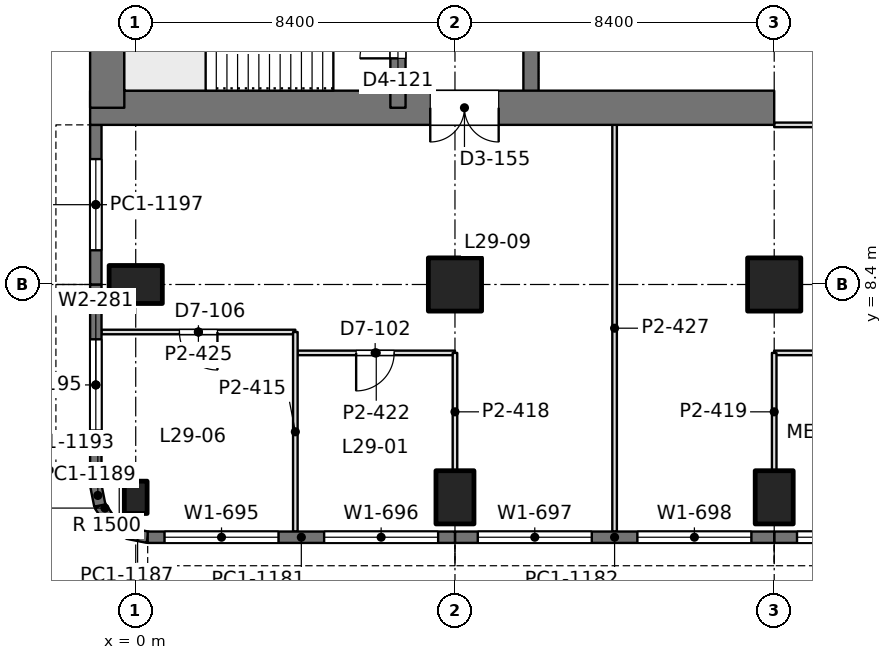
"""IFC4 building model, lengths in metres.
Left out: names, types, materials, properties, quantities, classifications, styles, units other than length and angle.
Written with IfcOpenShell. Run it as: python <this file> out.ifc"""

import sys

from ifc_helpers import new_model, si_unit, direction, frame, frame_2d, origin, origin_2d, place, context, subcontext, project, spatial, rectangle, extrude, element, fill, save


model = new_model("IFC4")
c1 = context("Model", 3, precision=1e-05, world=origin(), true_north=direction((0.0, 1.0)))
c2 = subcontext(c1, "Body", "Model", "MODEL_VIEW")
j1 = project(units=[si_unit("LENGTHUNIT", "METRE"), si_unit("PLANEANGLEUNIT", "RADIAN")], contexts=[c1])
p1 = place(None, origin())
s1 = spatial("IfcSite", under=j1, at=p1, CompositionType="ELEMENT")
p2 = place(p1, origin())
s2 = spatial("IfcBuilding", under=s1, at=p2, CompositionType="ELEMENT")
p3 = place(p2, frame((0.0, 0.0, 130.2)))
s3 = spatial("IfcBuildingStorey", under=s2, at=p3, CompositionType="ELEMENT", Elevation=130.2)
p4 = place(p3, frame((0.0, 2.8, 0.0), z_axis=(0.0, 0.0, 1.0), x_axis=(1.0, 0.0, 0.0)))
e1 = element("IfcColumn", 1, at=p4, inside=s3, PredefinedType="COLUMN", context=c2, shape_type="SweptSolid", body=[
    extrude(rectangle(XDim=0.6, YDim=0.85, at=origin_2d()), origin(), (0.0, 0.0, 1.0), 4.2),
])
for number, where, z_axis, x_axis in (
    (2, (0.0, 8.4, 0.0), (0.0, 0.0, 1.0), (0.0, 1.0, 0.0)),
    (3, (8.4, 2.8, 0.0), (0.0, 0.0, 1.0), (1.0, 0.0, 0.0)),
):
    element("IfcColumn", number, at=place(p3, frame(where, z_axis=z_axis, x_axis=x_axis)), inside=s3, PredefinedType="COLUMN", context=c2, shape_type="SweptSolid", body=[
        extrude(rectangle(XDim=1.0, YDim=1.4, at=origin_2d()), origin(), (0.0, 0.0, 1.0), 4.2),
    ])
p5 = place(p3, frame((8.4, 8.4, 0.0), z_axis=(0.0, 0.0, 1.0), x_axis=(1.0, 0.0, 0.0)))
e4 = element("IfcColumn", 4, at=p5, inside=s3, PredefinedType="COLUMN", context=c2, shape_type="SweptSolid", body=[
    extrude(rectangle(XDim=1.4, YDim=1.4, at=origin_2d()), origin(), (0.0, 0.0, 1.0), 4.2),
])
p6 = place(p3, frame((16.8, 2.8, 0.0), z_axis=(0.0, 0.0, 1.0), x_axis=(1.0, 0.0, 0.0)))
e5 = element("IfcColumn", 5, at=p6, inside=s3, PredefinedType="COLUMN", context=c2, shape_type="SweptSolid", body=[
    extrude(rectangle(XDim=1.0, YDim=1.4, at=origin_2d()), origin(), (0.0, 0.0, 1.0), 4.2),
])
p7 = place(p3, frame((16.8, 8.4, 0.0), z_axis=(0.0, 0.0, 1.0), x_axis=(1.0, 0.0, 0.0)))
e6 = element("IfcColumn", 6, at=p7, inside=s3, PredefinedType="COLUMN", context=c2, shape_type="SweptSolid", body=[
    extrude(rectangle(XDim=1.4, YDim=1.4, at=origin_2d()), origin(), (0.0, 0.0, 1.0), 4.2),
])
p8 = place(p3, frame((-1.2, 13.05, 0.0), z_axis=(0.0, 0.0, 1.0), x_axis=(1.0, 0.0, 0.0)))
e7 = element("IfcWall", 7, at=p8, inside=s3, PredefinedType="SHEAR", context=c2, shape_type="SweptSolid", body=[
    extrude(rectangle(XDim=18.0, YDim=0.9, at=frame_2d((9.0, 0.0))), origin(), (0.0, 0.0, 1.0), 4.2),
])
p9 = place(p8, frame((8.95, 0.0, 0.0)))
e8 = element("IfcOpeningElement", 8, at=p9, cuts=e7, PredefinedType="OPENING", context=c2, shape_type="SweptSolid", body=[
    extrude(rectangle(XDim=1.8, YDim=2.4, at=frame_2d((0.9, 1.2))), frame((0.0, 0.46, 0.0), z_axis=(0.0, -1.0, 0.0), x_axis=(1.0, 0.0, 0.0)), (0.0, 0.0, 1.0), 0.92),
])
p10 = place(p3, frame((-0.75, 13.05, 0.0), z_axis=(0.0, 0.0, 1.0), x_axis=(0.0, 1.0, 0.0)))
e9 = element("IfcWall", 9, at=p10, inside=s3, PredefinedType="SHEAR", context=c2, shape_type="SweptSolid", body=[
    extrude(rectangle(XDim=24.3, YDim=0.9, at=frame_2d((12.15, 0.0))), origin(), (0.0, 0.0, 1.0), 4.2),
])
p11 = place(p3, frame((6.9, 13.05, 0.0), z_axis=(0.0, 0.0, 1.0), x_axis=(0.0, 1.0, 0.0)))
e10 = element("IfcWall", 10, at=p11, inside=s3, PredefinedType="SHEAR", context=c2, shape_type="SweptSolid", body=[
    extrude(rectangle(XDim=24.3, YDim=0.4, at=frame_2d((12.15, 0.0))), origin(), (0.0, 0.0, 1.0), 4.2),
])
p12 = place(p11, frame((1.3, 0.0, 0.0)))
e11 = element("IfcOpeningElement", 11, at=p12, cuts=e10, PredefinedType="OPENING", context=c2, shape_type="SweptSolid", body=[
    extrude(rectangle(XDim=1.0, YDim=2.2, at=frame_2d((0.5, 1.1))), frame((0.0, 0.21, 0.0), z_axis=(0.0, -1.0, 0.0), x_axis=(1.0, 0.0, 0.0)), (0.0, 0.0, 1.0), 0.42),
])
p13 = place(p11, frame((22.0, 0.0, 0.0)))
e12 = element("IfcOpeningElement", 12, at=p13, cuts=e10, PredefinedType="OPENING", context=c2, shape_type="SweptSolid", body=[
    extrude(rectangle(XDim=1.0, YDim=2.2, at=frame_2d((0.5, 1.1))), frame((0.0, 0.21, 0.0), z_axis=(0.0, -1.0, 0.0), x_axis=(1.0, 0.0, 0.0)), (0.0, 0.0, 1.0), 0.42),
])
p14 = place(p11, frame((5.55, 0.0, 0.0)))
e13 = element("IfcOpeningElement", 13, at=p14, cuts=e10, PredefinedType="OPENING", context=c2, shape_type="SweptSolid", body=[
    extrude(rectangle(XDim=1.0, YDim=2.2, at=frame_2d((0.5, 1.1))), frame((0.0, 0.21, 0.0), z_axis=(0.0, -1.0, 0.0), x_axis=(1.0, 0.0, 0.0)), (0.0, 0.0, 1.0), 0.42),
])
p15 = place(p11, frame((9.55, 0.0, 0.0)))
e14 = element("IfcOpeningElement", 14, at=p15, cuts=e10, PredefinedType="OPENING", context=c2, shape_type="SweptSolid", body=[
    extrude(rectangle(XDim=1.0, YDim=2.2, at=frame_2d((0.5, 1.1))), frame((0.0, 0.21, 0.0), z_axis=(0.0, -1.0, 0.0), x_axis=(1.0, 0.0, 0.0)), (0.0, 0.0, 1.0), 0.42),
])
p16 = place(p11, frame((12.8, 0.0, 0.0)))
e15 = element("IfcOpeningElement", 15, at=p16, cuts=e10, PredefinedType="OPENING", context=c2, shape_type="SweptSolid", body=[
    extrude(rectangle(XDim=1.1, YDim=2.2, at=frame_2d((0.55, 1.1))), frame((0.0, 0.21, 0.0), z_axis=(0.0, -1.0, 0.0), x_axis=(1.0, 0.0, 0.0)), (0.0, 0.0, 1.0), 0.42),
])
p17 = place(p11, frame((15.538, 0.0, 0.0)))
e16 = element("IfcOpeningElement", 16, at=p17, cuts=e10, PredefinedType="OPENING", context=c2, shape_type="SweptSolid", body=[
    extrude(rectangle(XDim=1.1, YDim=2.2, at=frame_2d((0.55, 1.1))), frame((0.0, 0.21, 0.0), z_axis=(0.0, -1.0, 0.0), x_axis=(1.0, 0.0, 0.0)), (0.0, 0.0, 1.0), 0.42),
])
p18 = place(p11, frame((18.262, 0.0, 0.0)))
e17 = element("IfcOpeningElement", 17, at=p18, cuts=e10, PredefinedType="OPENING", context=c2, shape_type="SweptSolid", body=[
    extrude(rectangle(XDim=1.1, YDim=2.2, at=frame_2d((0.55, 1.1))), frame((0.0, 0.21, 0.0), z_axis=(0.0, -1.0, 0.0), x_axis=(1.0, 0.0, 0.0)), (0.0, 0.0, 1.0), 0.42),
])
p19 = place(p3, frame((10.4, 13.05, 0.0), z_axis=(0.0, 0.0, 1.0), x_axis=(0.0, 1.0, 0.0)))
e18 = element("IfcWall", 18, at=p19, inside=s3, PredefinedType="SHEAR", context=c2, shape_type="SweptSolid", body=[
    extrude(rectangle(XDim=24.3, YDim=0.4, at=frame_2d((12.15, 0.0))), origin(), (0.0, 0.0, 1.0), 4.2),
])
p20 = place(p19, frame((10.05, 0.0, 0.0)))
e19 = element("IfcOpeningElement", 19, at=p20, cuts=e18, PredefinedType="OPENING", context=c2, shape_type="SweptSolid", body=[
    extrude(rectangle(XDim=1.1, YDim=2.2, at=frame_2d((0.55, 1.1))), frame((0.0, 0.21, 0.0), z_axis=(0.0, -1.0, 0.0), x_axis=(1.0, 0.0, 0.0)), (0.0, 0.0, 1.0), 0.42),
])
p21 = place(p19, frame((12.9, 0.0, 0.0)))
e20 = element("IfcOpeningElement", 20, at=p21, cuts=e18, PredefinedType="OPENING", context=c2, shape_type="SweptSolid", body=[
    extrude(rectangle(XDim=1.1, YDim=2.2, at=frame_2d((0.55, 1.1))), frame((0.0, 0.21, 0.0), z_axis=(0.0, -1.0, 0.0), x_axis=(1.0, 0.0, 0.0)), (0.0, 0.0, 1.0), 0.42),
])
p22 = place(p19, frame((21.45, 0.0, 0.0)))
e21 = element("IfcOpeningElement", 21, at=p22, cuts=e18, PredefinedType="OPENING", context=c2, shape_type="SweptSolid", body=[
    extrude(rectangle(XDim=1.1, YDim=2.2, at=frame_2d((0.55, 1.1))), frame((0.0, 0.21, 0.0), z_axis=(0.0, -1.0, 0.0), x_axis=(1.0, 0.0, 0.0)), (0.0, 0.0, 1.0), 0.42),
])
p23 = place(p19, frame((2.35, 0.0, 0.0)))
e22 = element("IfcOpeningElement", 22, at=p23, cuts=e18, PredefinedType="OPENING", context=c2, shape_type="SweptSolid", body=[
    extrude(rectangle(XDim=1.8, YDim=2.4, at=frame_2d((0.9, 1.2))), frame((0.0, 0.21, 0.0), z_axis=(0.0, -1.0, 0.0), x_axis=(1.0, 0.0, 0.0)), (0.0, 0.0, 1.0), 0.42),
])
p24 = place(p19, frame((5.8, 0.0, 0.0)))
e23 = element("IfcOpeningElement", 23, at=p24, cuts=e18, PredefinedType="OPENING", context=c2, shape_type="SweptSolid", body=[
    extrude(rectangle(XDim=1.8, YDim=2.4, at=frame_2d((0.9, 1.2))), frame((0.0, 0.21, 0.0), z_axis=(0.0, -1.0, 0.0), x_axis=(1.0, 0.0, 0.0)), (0.0, 0.0, 1.0), 0.42),
])
p25 = place(p3, frame((25.2, 1.75, 0.0), z_axis=(0.0, 0.0, 1.0), x_axis=(-1.0, 0.0, 0.0)))
e24 = element("IfcWall", 24, at=p25, inside=s3, PredefinedType="SOLIDWALL", context=c2, shape_type="SweptSolid", body=[
    extrude(rectangle(XDim=8.4, YDim=0.3, at=frame_2d((4.2, 0.0))), origin(), (0.0, 0.0, 1.0), 4.05),
])
p26 = place(p25, frame((0.6, 0.0, 0.9)))
e25 = element("IfcOpeningElement", 25, at=p26, cuts=e24, PredefinedType="OPENING", context=c2, shape_type="SweptSolid", body=[
    extrude(rectangle(XDim=3.0, YDim=1.9, at=frame_2d((1.5, 0.95))), frame((0.0, 0.16, 0.0), z_axis=(0.0, -1.0, 0.0), x_axis=(1.0, 0.0, 0.0)), (0.0, 0.0, 1.0), 0.32),
])
p27 = place(p25, frame((4.8, 0.0, 0.9)))
e26 = element("IfcOpeningElement", 26, at=p27, cuts=e24, PredefinedType="OPENING", context=c2, shape_type="SweptSolid", body=[
    extrude(rectangle(XDim=3.0, YDim=1.9, at=frame_2d((1.5, 0.95))), frame((0.0, 0.16, 0.0), z_axis=(0.0, -1.0, 0.0), x_axis=(1.0, 0.0, 0.0)), (0.0, 0.0, 1.0), 0.32),
])
p28 = place(p3, frame((16.8, 1.75, 0.0), z_axis=(0.0, 0.0, 1.0), x_axis=(-1.0, 0.0, 0.0)))
e27 = element("IfcWall", 27, at=p28, inside=s3, PredefinedType="SOLIDWALL", context=c2, shape_type="SweptSolid", body=[
    extrude(rectangle(XDim=8.4, YDim=0.3, at=frame_2d((4.2, 0.0))), origin(), (0.0, 0.0, 1.0), 4.05),
])
p29 = place(p28, frame((0.6, 0.0, 0.9)))
e28 = element("IfcOpeningElement", 28, at=p29, cuts=e27, PredefinedType="OPENING", context=c2, shape_type="SweptSolid", body=[
    extrude(rectangle(XDim=3.0, YDim=1.9, at=frame_2d((1.5, 0.95))), frame((0.0, 0.16, 0.0), z_axis=(0.0, -1.0, 0.0), x_axis=(1.0, 0.0, 0.0)), (0.0, 0.0, 1.0), 0.32),
])
p30 = place(p28, frame((4.8, 0.0, 0.9)))
e29 = element("IfcOpeningElement", 29, at=p30, cuts=e27, PredefinedType="OPENING", context=c2, shape_type="SweptSolid", body=[
    extrude(rectangle(XDim=3.0, YDim=1.9, at=frame_2d((1.5, 0.95))), frame((0.0, 0.16, 0.0), z_axis=(0.0, -1.0, 0.0), x_axis=(1.0, 0.0, 0.0)), (0.0, 0.0, 1.0), 0.32),
])
p31 = place(p3, frame((8.4, 1.75, 0.0), z_axis=(0.0, 0.0, 1.0), x_axis=(-1.0, 0.0, 0.0)))
e30 = element("IfcWall", 30, at=p31, inside=s3, PredefinedType="SOLIDWALL", context=c2, shape_type="SweptSolid", body=[
    extrude(rectangle(XDim=8.085, YDim=0.3, at=frame_2d((4.042, 0.0))), origin(), (0.0, 0.0, 1.0), 4.05),
])
p32 = place(p31, frame((0.443, 0.0, 0.9)))
e31 = element("IfcOpeningElement", 31, at=p32, cuts=e30, PredefinedType="OPENING", context=c2, shape_type="SweptSolid", body=[
    extrude(rectangle(XDim=3.0, YDim=1.9, at=frame_2d((1.5, 0.95))), frame((0.0, 0.16, 0.0), z_axis=(0.0, -1.0, 0.0), x_axis=(1.0, 0.0, 0.0)), (0.0, 0.0, 1.0), 0.32),
])
p33 = place(p31, frame((4.643, 0.0, 0.9)))
e32 = element("IfcOpeningElement", 32, at=p33, cuts=e30, PredefinedType="OPENING", context=c2, shape_type="SweptSolid", body=[
    extrude(rectangle(XDim=3.0, YDim=1.9, at=frame_2d((1.5, 0.95))), frame((0.0, 0.16, 0.0), z_axis=(0.0, -1.0, 0.0), x_axis=(1.0, 0.0, 0.0)), (0.0, 0.0, 1.0), 0.32),
])
p34 = place(p3, frame((0.315, 1.75, 0.0), z_axis=(0.0, 0.0, 1.0), x_axis=(-0.980788534345, 0.195073962632, 0.0)))
e33 = element("IfcWall", 33, at=p34, inside=s3, PredefinedType="SOLIDWALL", context=c2, shape_type="SweptSolid", body=[
    extrude(rectangle(XDim=0.541, YDim=0.3, at=frame_2d((0.271, 0.0))), origin(), (0.0, 0.0, 1.0), 4.05),
])
for number, where, z_axis, x_axis in (
    (34, (-0.216, 1.855, 0.0), (0.0, 0.0, 1.0), (-0.831, 0.556, 0.0)),
    (35, (-0.653, 2.147, 0.0), (0.0, 0.0, 1.0), (-0.556, 0.831, 0.0)),
):
    element("IfcWall", number, at=place(p3, frame(where, z_axis=z_axis, x_axis=x_axis)), inside=s3, PredefinedType="SOLIDWALL", context=c2, shape_type="SweptSolid", body=[
        extrude(rectangle(XDim=0.526, YDim=0.3, at=frame_2d((0.263, 0.0))), origin(), (0.0, 0.0, 1.0), 4.05),
    ])
p35 = place(p3, frame((-0.945, 2.584, 0.0), z_axis=(0.0, 0.0, 1.0), x_axis=(-0.195073962632, 0.980788534345, 0.0)))
e36 = element("IfcWall", 36, at=p35, inside=s3, PredefinedType="SOLIDWALL", context=c2, shape_type="SweptSolid", body=[
    extrude(rectangle(XDim=0.541, YDim=0.3, at=frame_2d((0.271, 0.0))), origin(), (0.0, 0.0, 1.0), 4.05),
])
p36 = place(p3, frame((-1.05, 3.115, 0.0), z_axis=(0.0, 0.0, 1.0), x_axis=(0.0, 1.0, 0.0)))
e37 = element("IfcWall", 37, at=p36, inside=s3, PredefinedType="SOLIDWALL", context=c2, shape_type="SweptSolid", body=[
    extrude(rectangle(XDim=5.285, YDim=0.3, at=frame_2d((2.643, 0.0))), origin(), (0.0, 0.0, 1.0), 4.05),
])
p37 = place(p36, frame((1.443, 0.0, 0.9)))
e38 = element("IfcOpeningElement", 38, at=p37, cuts=e37, PredefinedType="OPENING", context=c2, shape_type="SweptSolid", body=[
    extrude(rectangle(XDim=2.4, YDim=1.9, at=frame_2d((1.2, 0.95))), frame((0.0, 0.16, 0.0), z_axis=(0.0, -1.0, 0.0), x_axis=(1.0, 0.0, 0.0)), (0.0, 0.0, 1.0), 0.32),
])
p38 = place(p3, frame((-1.05, 8.4, 0.0), z_axis=(0.0, 0.0, 1.0), x_axis=(0.0, 1.0, 0.0)))
e39 = element("IfcWall", 39, at=p38, inside=s3, PredefinedType="SOLIDWALL", context=c2, shape_type="SweptSolid", body=[
    extrude(rectangle(XDim=4.2, YDim=0.3, at=frame_2d((2.1, 0.0))), origin(), (0.0, 0.0, 1.0), 4.05),
])
p39 = place(p38, frame((0.9, 0.0, 0.9)))
e40 = element("IfcOpeningElement", 40, at=p39, cuts=e39, PredefinedType="OPENING", context=c2, shape_type="SweptSolid", body=[
    extrude(rectangle(XDim=2.4, YDim=1.9, at=frame_2d((1.2, 0.95))), frame((0.0, 0.16, 0.0), z_axis=(0.0, -1.0, 0.0), x_axis=(1.0, 0.0, 0.0)), (0.0, 0.0, 1.0), 0.32),
])
p40 = place(p3, frame((-0.902, 7.15, 0.0), z_axis=(0.0, 0.0, 1.0), x_axis=(1.0, 0.0, 0.0)))
e41 = element("IfcWall", 41, at=p40, inside=s3, PredefinedType="PARTITIONING", context=c2, shape_type="SweptSolid", body=[
    extrude(rectangle(XDim=5.102, YDim=0.12, at=frame_2d((2.551, 0.0))), origin(), (0.0, 0.0, 1.0), 3.56),
])
p41 = place(p40, frame((2.052, 0.0, 0.0)))
e42 = element("IfcOpeningElement", 42, at=p41, cuts=e41, PredefinedType="OPENING", context=c2, shape_type="SweptSolid", body=[
    extrude(rectangle(XDim=1.0, YDim=2.4, at=frame_2d((0.5, 1.2))), frame((0.0, 0.07, 0.0), z_axis=(0.0, -1.0, 0.0), x_axis=(1.0, 0.0, 0.0)), (0.0, 0.0, 1.0), 0.14),
])
p42 = place(p3, frame((4.258, 6.6, 0.0), z_axis=(0.0, 0.0, 1.0), x_axis=(1.0, 0.0, 0.0)))
e43 = element("IfcWall", 43, at=p42, inside=s3, PredefinedType="PARTITIONING", context=c2, shape_type="SweptSolid", body=[
    extrude(rectangle(XDim=4.142, YDim=0.12, at=frame_2d((2.071, 0.0))), origin(), (0.0, 0.0, 1.0), 3.55),
])
p43 = place(p42, frame((1.542, 0.0, 0.0)))
e44 = element("IfcOpeningElement", 44, at=p43, cuts=e43, PredefinedType="OPENING", context=c2, shape_type="SweptSolid", body=[
    extrude(rectangle(XDim=1.0, YDim=2.4, at=frame_2d((0.5, 1.2))), frame((0.0, 0.07, 0.0), z_axis=(0.0, -1.0, 0.0), x_axis=(1.0, 0.0, 0.0)), (0.0, 0.0, 1.0), 0.14),
])
p44 = place(p3, frame((4.2, 1.898, 0.0), z_axis=(0.0, 0.0, 1.0), x_axis=(0.0, 1.0, 0.0)))
e45 = element("IfcWall", 45, at=p44, inside=s3, PredefinedType="PARTITIONING", context=c2, shape_type="SweptSolid", body=[
    extrude(rectangle(XDim=5.252, YDim=0.12, at=frame_2d((2.626, 0.0))), origin(), (0.0, 0.0, 1.0), 3.56),
])
p45 = place(p3, frame((8.4, 3.499, 0.0), z_axis=(0.0, 0.0, 1.0), x_axis=(0.0, 1.0, 0.0)))
e46 = element("IfcWall", 46, at=p45, inside=s3, PredefinedType="PARTITIONING", context=c2, shape_type="SweptSolid", body=[
    extrude(rectangle(XDim=3.101, YDim=0.12, at=frame_2d((1.551, 0.0))), origin(), (0.0, 0.0, 1.0), 3.55),
])
p46 = place(p3, frame((16.8, 6.6, 0.0), z_axis=(0.0, 0.0, 1.0), x_axis=(1.0, 0.0, 0.0)))
e47 = element("IfcWall", 47, at=p46, inside=s3, PredefinedType="PARTITIONING", context=c2, shape_type="SweptSolid", body=[
    extrude(rectangle(XDim=8.4, YDim=0.12, at=frame_2d((4.2, 0.0))), origin(), (0.0, 0.0, 1.0), 3.55),
])
p47 = place(p46, frame((3.3, 0.0, 0.0)))
e48 = element("IfcOpeningElement", 48, at=p47, cuts=e47, PredefinedType="OPENING", context=c2, shape_type="SweptSolid", body=[
    extrude(rectangle(XDim=1.8, YDim=2.2, at=frame_2d((0.9, 1.1))), frame((0.0, 0.07, 0.0), z_axis=(0.0, -1.0, 0.0), x_axis=(1.0, 0.0, 0.0)), (0.0, 0.0, 1.0), 0.14),
])
p48 = place(p3, frame((16.8, 3.499, 0.0), z_axis=(0.0, 0.0, 1.0), x_axis=(0.0, 1.0, 0.0)))
e49 = element("IfcWall", 49, at=p48, inside=s3, PredefinedType="PARTITIONING", context=c2, shape_type="SweptSolid", body=[
    extrude(rectangle(XDim=3.101, YDim=0.12, at=frame_2d((1.551, 0.0))), origin(), (0.0, 0.0, 1.0), 3.55),
])
p49 = place(p3, frame((12.6, 1.898, 0.0), z_axis=(0.0, 0.0, 1.0), x_axis=(0.0, 1.0, 0.0)))
e50 = element("IfcWall", 50, at=p49, inside=s3, PredefinedType="PARTITIONING", context=c2, shape_type="SweptSolid", body=[
    extrude(rectangle(XDim=10.704, YDim=0.12, at=frame_2d((5.352, 0.0))), origin(), (0.0, 0.0, 1.0), 3.55),
])
p50 = place(p3, frame((16.8, 12.6, 0.0), z_axis=(0.0, 0.0, 1.0), x_axis=(1.0, 0.0, 0.0)))
e51 = element("IfcWall", 51, at=p50, inside=s3, PredefinedType="PARTITIONING", context=c2, shape_type="SweptSolid", body=[
    extrude(rectangle(XDim=16.8, YDim=0.12, at=frame_2d((8.4, 0.0))), origin(), (0.0, 0.0, 1.0), 3.55),
])
p51 = place(p27, origin())
e52 = element("IfcWindow", 52, at=p51, inside=s3, PartitioningType="SINGLE_PANEL", PredefinedType="WINDOW", context=c2, shape_type="SweptSolid", body=[
    extrude(rectangle(XDim=3.0, YDim=1.9, at=frame_2d((1.5, 0.95))), frame((0.0, 0.03, 0.0), z_axis=(0.0, -1.0, 0.0), x_axis=(1.0, 0.0, 0.0)), (0.0, 0.0, 1.0), 0.06),
])
fill(e26, e52)
p52 = place(p29, origin())
e53 = element("IfcWindow", 53, at=p52, inside=s3, PartitioningType="SINGLE_PANEL", PredefinedType="WINDOW", context=c2, shape_type="SweptSolid", body=[
    extrude(rectangle(XDim=3.0, YDim=1.9, at=frame_2d((1.5, 0.95))), frame((0.0, 0.03, 0.0), z_axis=(0.0, -1.0, 0.0), x_axis=(1.0, 0.0, 0.0)), (0.0, 0.0, 1.0), 0.06),
])
fill(e28, e53)
p53 = place(p30, origin())
e54 = element("IfcWindow", 54, at=p53, inside=s3, PartitioningType="SINGLE_PANEL", PredefinedType="WINDOW", context=c2, shape_type="SweptSolid", body=[
    extrude(rectangle(XDim=3.0, YDim=1.9, at=frame_2d((1.5, 0.95))), frame((0.0, 0.03, 0.0), z_axis=(0.0, -1.0, 0.0), x_axis=(1.0, 0.0, 0.0)), (0.0, 0.0, 1.0), 0.06),
])
fill(e29, e54)
p54 = place(p32, origin())
e55 = element("IfcWindow", 55, at=p54, inside=s3, PartitioningType="SINGLE_PANEL", PredefinedType="WINDOW", context=c2, shape_type="SweptSolid", body=[
    extrude(rectangle(XDim=3.0, YDim=1.9, at=frame_2d((1.5, 0.95))), frame((0.0, 0.03, 0.0), z_axis=(0.0, -1.0, 0.0), x_axis=(1.0, 0.0, 0.0)), (0.0, 0.0, 1.0), 0.06),
])
fill(e31, e55)
p55 = place(p33, origin())
e56 = element("IfcWindow", 56, at=p55, inside=s3, PartitioningType="SINGLE_PANEL", PredefinedType="WINDOW", context=c2, shape_type="SweptSolid", body=[
    extrude(rectangle(XDim=3.0, YDim=1.9, at=frame_2d((1.5, 0.95))), frame((0.0, 0.03, 0.0), z_axis=(0.0, -1.0, 0.0), x_axis=(1.0, 0.0, 0.0)), (0.0, 0.0, 1.0), 0.06),
])
fill(e32, e56)
p56 = place(p37, origin())
e57 = element("IfcWindow", 57, at=p56, inside=s3, PartitioningType="SINGLE_PANEL", PredefinedType="WINDOW", context=c2, shape_type="SweptSolid", body=[
    extrude(rectangle(XDim=2.4, YDim=1.9, at=frame_2d((1.2, 0.95))), frame((0.0, 0.03, 0.0), z_axis=(0.0, -1.0, 0.0), x_axis=(1.0, 0.0, 0.0)), (0.0, 0.0, 1.0), 0.06),
])
fill(e38, e57)
p57 = place(p39, origin())
e58 = element("IfcWindow", 58, at=p57, inside=s3, PartitioningType="SINGLE_PANEL", PredefinedType="WINDOW", context=c2, shape_type="SweptSolid", body=[
    extrude(rectangle(XDim=2.4, YDim=1.9, at=frame_2d((1.2, 0.95))), frame((0.0, 0.03, 0.0), z_axis=(0.0, -1.0, 0.0), x_axis=(1.0, 0.0, 0.0)), (0.0, 0.0, 1.0), 0.06),
])
fill(e40, e58)
p58 = place(p9, frame((1.8, 0.0, 0.0), z_axis=(0.0, 0.0, 1.0), x_axis=(-1.0, 0.0, 0.0)))
e59 = element("IfcDoor", 59, at=p58, inside=s3, OperationType="DOUBLE_DOOR_SINGLE_SWING", PredefinedType="DOOR", context=c2, shape_type="SweptSolid", body=[
    extrude(rectangle(XDim=1.8, YDim=2.4, at=frame_2d((0.9, 1.2))), frame((0.0, 0.025, 0.0), z_axis=(0.0, -1.0, 0.0), x_axis=(1.0, 0.0, 0.0)), (0.0, 0.0, 1.0), 0.05),
])
fill(e8, e59)
p59 = place(p12, origin())
e60 = element("IfcDoor", 60, at=p59, inside=s3, OperationType="SINGLE_SWING_LEFT", PredefinedType="DOOR", context=c2, shape_type="SweptSolid", body=[
    extrude(rectangle(XDim=1.0, YDim=2.2, at=frame_2d((0.5, 1.1))), frame((0.0, 0.025, 0.0), z_axis=(0.0, -1.0, 0.0), x_axis=(1.0, 0.0, 0.0)), (0.0, 0.0, 1.0), 0.05),
])
fill(e11, e60)
p60 = place(p41, frame((1.0, 0.0, 0.0), z_axis=(0.0, 0.0, 1.0), x_axis=(-1.0, 0.0, 0.0)))
e61 = element("IfcDoor", 61, at=p60, inside=s3, OperationType="SINGLE_SWING_LEFT", PredefinedType="DOOR", context=c2, shape_type="SweptSolid", body=[
    extrude(rectangle(XDim=1.0, YDim=2.4, at=frame_2d((0.5, 1.2))), frame((0.0, 0.025, 0.0), z_axis=(0.0, -1.0, 0.0), x_axis=(1.0, 0.0, 0.0)), (0.0, 0.0, 1.0), 0.05),
])
fill(e42, e61)
p61 = place(p43, frame((1.0, 0.0, 0.0), z_axis=(0.0, 0.0, 1.0), x_axis=(-1.0, 0.0, 0.0)))
e62 = element("IfcDoor", 62, at=p61, inside=s3, OperationType="SINGLE_SWING_RIGHT", PredefinedType="DOOR", context=c2, shape_type="SweptSolid", body=[
    extrude(rectangle(XDim=1.0, YDim=2.4, at=frame_2d((0.5, 1.2))), frame((0.0, 0.025, 0.0), z_axis=(0.0, -1.0, 0.0), x_axis=(1.0, 0.0, 0.0)), (0.0, 0.0, 1.0), 0.05),
])
fill(e44, e62)
save(model, sys.argv[1])
